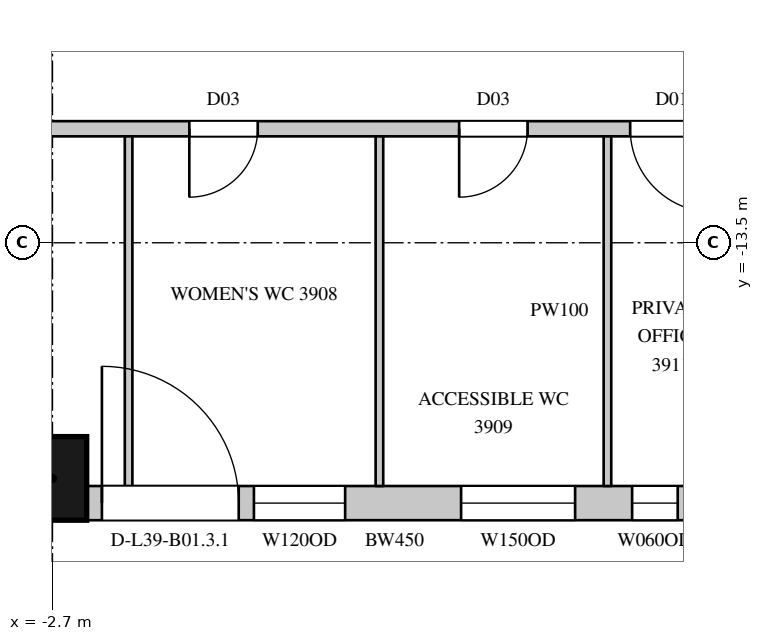
"""IFC4 building model, lengths in metres.
Left out: names, types, materials, properties, quantities, classifications, styles, units other than length and angle.
Written with IfcOpenShell. Run it as: python <this file> out.ifc"""

import sys

from ifc_helpers import new_model, si_unit, direction, frame, frame_2d, origin, origin_2d, place, context, subcontext, project, spatial, rectangle, extrude, element, fill, save


model = new_model("IFC4")
c1 = context("Model", 3, precision=1e-05, world=origin(), true_north=direction((0.0, 1.0)))
c2 = subcontext(c1, "Body", "Model", "MODEL_VIEW")
j1 = project(units=[si_unit("LENGTHUNIT", "METRE"), si_unit("PLANEANGLEUNIT", "RADIAN")], contexts=[c1])
p1 = place(None, origin())
s1 = spatial("IfcSite", under=j1, at=p1, CompositionType="ELEMENT")
p2 = place(p1, origin())
s2 = spatial("IfcBuilding", under=s1, at=p2, CompositionType="ELEMENT")
p3 = place(p2, frame((0.0, 0.0, 181.0)))
s3 = spatial("IfcBuildingStorey", under=s2, at=p3, CompositionType="ELEMENT", Elevation=181.0)
p4 = place(p3, frame((-2.7, -16.6, 0.0), z_axis=(0.0, 0.0, 1.0), x_axis=(1.0, 0.0, 0.0)))
e1 = element("IfcColumn", 1, at=p4, inside=s3, PredefinedType="COLUMN", context=c2, shape_type="SweptSolid", body=[
    extrude(rectangle(XDim=0.9, YDim=1.1, at=origin_2d()), origin(), (0.0, 0.0, 1.0), 4.1),
])
p5 = place(p3, frame((-2.25, -16.925, 0.0), z_axis=(0.0, 0.0, 1.0), x_axis=(1.0, 0.0, 0.0)))
e2 = element("IfcWall", 2, at=p5, inside=s3, PredefinedType="SOLIDWALL", context=c2, shape_type="SweptSolid", body=[
    extrude(rectangle(XDim=8.1, YDim=0.45, at=frame_2d((4.05, 0.0))), origin(), (0.0, 0.0, 1.0), 3.8),
])
p6 = place(p5, frame((0.2, 0.0, 0.0)))
e3 = element("IfcOpeningElement", 3, at=p6, cuts=e2, PredefinedType="OPENING", context=c2, shape_type="SweptSolid", body=[
    extrude(rectangle(XDim=1.8, YDim=2.4, at=frame_2d((0.9, 1.2))), frame((0.0, 0.235, 0.0), z_axis=(0.0, -1.0, 0.0), x_axis=(1.0, 0.0, 0.0)), (0.0, 0.0, 1.0), 0.47),
])
p7 = place(p5, frame((2.2, 0.0, 1.05)))
e4 = element("IfcOpeningElement", 4, at=p7, cuts=e2, PredefinedType="OPENING", context=c2, shape_type="SweptSolid", body=[
    extrude(rectangle(XDim=1.2, YDim=2.4, at=frame_2d((0.6, 1.2))), frame((0.0, 0.235, 0.0), z_axis=(0.0, -1.0, 0.0), x_axis=(1.0, 0.0, 0.0)), (0.0, 0.0, 1.0), 0.47),
])
p8 = place(p5, frame((4.926, 0.0, 1.05)))
e5 = element("IfcOpeningElement", 5, at=p8, cuts=e2, PredefinedType="OPENING", context=c2, shape_type="SweptSolid", body=[
    extrude(rectangle(XDim=1.5, YDim=2.4, at=frame_2d((0.75, 1.2))), frame((0.0, 0.235, 0.0), z_axis=(0.0, -1.0, 0.0), x_axis=(1.0, 0.0, 0.0)), (0.0, 0.0, 1.0), 0.47),
])
p9 = place(p5, frame((7.176, 0.0, 1.05)))
e6 = element("IfcOpeningElement", 6, at=p9, cuts=e2, PredefinedType="OPENING", context=c2, shape_type="SweptSolid", body=[
    extrude(rectangle(XDim=0.6, YDim=2.4, at=frame_2d((0.3, 1.2))), frame((0.0, 0.235, 0.0), z_axis=(0.0, -1.0, 0.0), x_axis=(1.0, 0.0, 0.0)), (0.0, 0.0, 1.0), 0.47),
])
p10 = place(p3, frame((-10.9, -12.0, 0.0), z_axis=(0.0, 0.0, 1.0), x_axis=(1.0, 0.0, 0.0)))
e7 = element("IfcWall", 7, at=p10, inside=s3, PredefinedType="PARTITIONING", context=c2, shape_type="SweptSolid", body=[
    extrude(rectangle(XDim=21.8, YDim=0.2, at=frame_2d((10.9, 0.0))), origin(), (0.0, 0.0, 1.0), 3.8),
])
p11 = place(p10, frame((0.95, 0.0, 0.0)))
e8 = element("IfcOpeningElement", 8, at=p11, cuts=e7, PredefinedType="OPENING", context=c2, shape_type="SweptSolid", body=[
    extrude(rectangle(XDim=0.9, YDim=2.2, at=frame_2d((0.45, 1.1))), frame((0.0, 0.11, 0.0), z_axis=(0.0, -1.0, 0.0), x_axis=(1.0, 0.0, 0.0)), (0.0, 0.0, 1.0), 0.22),
])
p12 = place(p10, frame((3.95, 0.0, 0.0)))
e9 = element("IfcOpeningElement", 9, at=p12, cuts=e7, PredefinedType="OPENING", context=c2, shape_type="SweptSolid", body=[
    extrude(rectangle(XDim=0.9, YDim=2.2, at=frame_2d((0.45, 1.1))), frame((0.0, 0.11, 0.0), z_axis=(0.0, -1.0, 0.0), x_axis=(1.0, 0.0, 0.0)), (0.0, 0.0, 1.0), 0.22),
])
p13 = place(p10, frame((6.7, 0.0, 0.0)))
e10 = element("IfcOpeningElement", 10, at=p13, cuts=e7, PredefinedType="OPENING", context=c2, shape_type="SweptSolid", body=[
    extrude(rectangle(XDim=0.9, YDim=2.2, at=frame_2d((0.45, 1.1))), frame((0.0, 0.11, 0.0), z_axis=(0.0, -1.0, 0.0), x_axis=(1.0, 0.0, 0.0)), (0.0, 0.0, 1.0), 0.22),
])
p14 = place(p10, frame((10.0, 0.0, 0.0)))
e11 = element("IfcOpeningElement", 11, at=p14, cuts=e7, PredefinedType="OPENING", context=c2, shape_type="SweptSolid", body=[
    extrude(rectangle(XDim=0.9, YDim=2.2, at=frame_2d((0.45, 1.1))), frame((0.0, 0.11, 0.0), z_axis=(0.0, -1.0, 0.0), x_axis=(1.0, 0.0, 0.0)), (0.0, 0.0, 1.0), 0.22),
])
p15 = place(p10, frame((13.55, 0.0, 0.0)))
e12 = element("IfcOpeningElement", 12, at=p15, cuts=e7, PredefinedType="OPENING", context=c2, shape_type="SweptSolid", body=[
    extrude(rectangle(XDim=0.9, YDim=2.2, at=frame_2d((0.45, 1.1))), frame((0.0, 0.11, 0.0), z_axis=(0.0, -1.0, 0.0), x_axis=(1.0, 0.0, 0.0)), (0.0, 0.0, 1.0), 0.22),
])
p16 = place(p10, frame((15.8, 0.0, 0.0)))
e13 = element("IfcOpeningElement", 13, at=p16, cuts=e7, PredefinedType="OPENING", context=c2, shape_type="SweptSolid", body=[
    extrude(rectangle(XDim=1.1, YDim=2.4, at=frame_2d((0.55, 1.2))), frame((0.0, 0.11, 0.0), z_axis=(0.0, -1.0, 0.0), x_axis=(1.0, 0.0, 0.0)), (0.0, 0.0, 1.0), 0.22),
])
p17 = place(p10, frame((18.0, 0.0, 0.0)))
e14 = element("IfcOpeningElement", 14, at=p17, cuts=e7, PredefinedType="OPENING", context=c2, shape_type="SweptSolid", body=[
    extrude(rectangle(XDim=1.1, YDim=2.4, at=frame_2d((0.55, 1.2))), frame((0.0, 0.11, 0.0), z_axis=(0.0, -1.0, 0.0), x_axis=(1.0, 0.0, 0.0)), (0.0, 0.0, 1.0), 0.22),
])
p18 = place(p3, frame((-1.699, -16.7, 0.0), z_axis=(0.0, 0.0, 1.0), x_axis=(0.0, 1.0, 0.0)))
e15 = element("IfcWall", 15, at=p18, inside=s3, PredefinedType="PARTITIONING", context=c2, shape_type="SweptSolid", body=[
    extrude(rectangle(XDim=4.6, YDim=0.1, at=frame_2d((2.3, 0.0))), origin(), (0.0, 0.0, 1.0), 3.8),
])
p19 = place(p3, frame((1.601, -16.7, 0.0), z_axis=(0.0, 0.0, 1.0), x_axis=(0.0, 1.0, 0.0)))
e16 = element("IfcWall", 16, at=p19, inside=s3, PredefinedType="PARTITIONING", context=c2, shape_type="SweptSolid", body=[
    extrude(rectangle(XDim=4.6, YDim=0.1, at=frame_2d((2.3, 0.0))), origin(), (0.0, 0.0, 1.0), 3.15),
])
p20 = place(p3, frame((4.601, -16.7, 0.0), z_axis=(0.0, 0.0, 1.0), x_axis=(0.0, 1.0, 0.0)))
e17 = element("IfcWall", 17, at=p20, inside=s3, PredefinedType="PARTITIONING", context=c2, shape_type="SweptSolid", body=[
    extrude(rectangle(XDim=4.6, YDim=0.1, at=frame_2d((2.3, 0.0))), origin(), (0.0, 0.0, 1.0), 3.8),
])
p21 = place(p6, origin())
e18 = element("IfcDoor", 18, at=p21, inside=s3, OperationType="SLIDING_TO_LEFT", PredefinedType="DOOR", context=c2, shape_type="SweptSolid", body=[
    extrude(rectangle(XDim=1.8, YDim=2.4, at=frame_2d((0.9, 1.2))), frame((0.0, 0.13, 0.0), z_axis=(0.0, -1.0, 0.0), x_axis=(1.0, 0.0, 0.0)), (0.0, 0.0, 1.0), 0.05),
])
fill(e3, e18)
p22 = place(p7, origin())
e19 = element("IfcWindow", 19, at=p22, inside=s3, PartitioningType="SINGLE_PANEL", PredefinedType="WINDOW", context=c2, shape_type="SweptSolid", body=[
    extrude(rectangle(XDim=1.2, YDim=2.4, at=frame_2d((0.6, 1.2))), frame((0.0, 0.135, 0.0), z_axis=(0.0, -1.0, 0.0), x_axis=(1.0, 0.0, 0.0)), (0.0, 0.0, 1.0), 0.06),
])
fill(e4, e19)
p23 = place(p14, origin())
e20 = element("IfcDoor", 20, at=p23, inside=s3, OperationType="SINGLE_SWING_RIGHT", PredefinedType="DOOR", context=c2, shape_type="SweptSolid", body=[
    extrude(rectangle(XDim=0.9, YDim=2.2, at=frame_2d((0.45, 1.1))), frame((0.0, 0.025, 0.0), z_axis=(0.0, -1.0, 0.0), x_axis=(1.0, 0.0, 0.0)), (0.0, 0.0, 1.0), 0.05),
])
fill(e11, e20)
p24 = place(p15, origin())
e21 = element("IfcDoor", 21, at=p24, inside=s3, OperationType="SINGLE_SWING_RIGHT", PredefinedType="DOOR", context=c2, shape_type="SweptSolid", body=[
    extrude(rectangle(XDim=0.9, YDim=2.2, at=frame_2d((0.45, 1.1))), frame((0.0, 0.025, 0.0), z_axis=(0.0, -1.0, 0.0), x_axis=(1.0, 0.0, 0.0)), (0.0, 0.0, 1.0), 0.05),
])
fill(e12, e21)
p25 = place(p16, origin())
e22 = element("IfcDoor", 22, at=p25, inside=s3, OperationType="SINGLE_SWING_LEFT", PredefinedType="DOOR", context=c2, shape_type="SweptSolid", body=[
    extrude(rectangle(XDim=1.1, YDim=2.4, at=frame_2d((0.55, 1.2))), frame((0.0, 0.025, 0.0), z_axis=(0.0, -1.0, 0.0), x_axis=(1.0, 0.0, 0.0)), (0.0, 0.0, 1.0), 0.05),
])
fill(e13, e22)
p26 = place(p8, origin())
e23 = element("IfcWindow", 23, at=p26, inside=s3, PartitioningType="SINGLE_PANEL", PredefinedType="WINDOW", context=c2, shape_type="SweptSolid", body=[
    extrude(rectangle(XDim=1.5, YDim=2.4, at=frame_2d((0.75, 1.2))), frame((0.0, 0.135, 0.0), z_axis=(0.0, -1.0, 0.0), x_axis=(1.0, 0.0, 0.0)), (0.0, 0.0, 1.0), 0.06),
])
fill(e5, e23)
p27 = place(p9, origin())
e24 = element("IfcWindow", 24, at=p27, inside=s3, PartitioningType="SINGLE_PANEL", PredefinedType="WINDOW", context=c2, shape_type="SweptSolid", body=[
    extrude(rectangle(XDim=0.6, YDim=2.4, at=frame_2d((0.3, 1.2))), frame((0.0, 0.135, 0.0), z_axis=(0.0, -1.0, 0.0), x_axis=(1.0, 0.0, 0.0)), (0.0, 0.0, 1.0), 0.06),
])
fill(e6, e24)
save(model, sys.argv[1])
